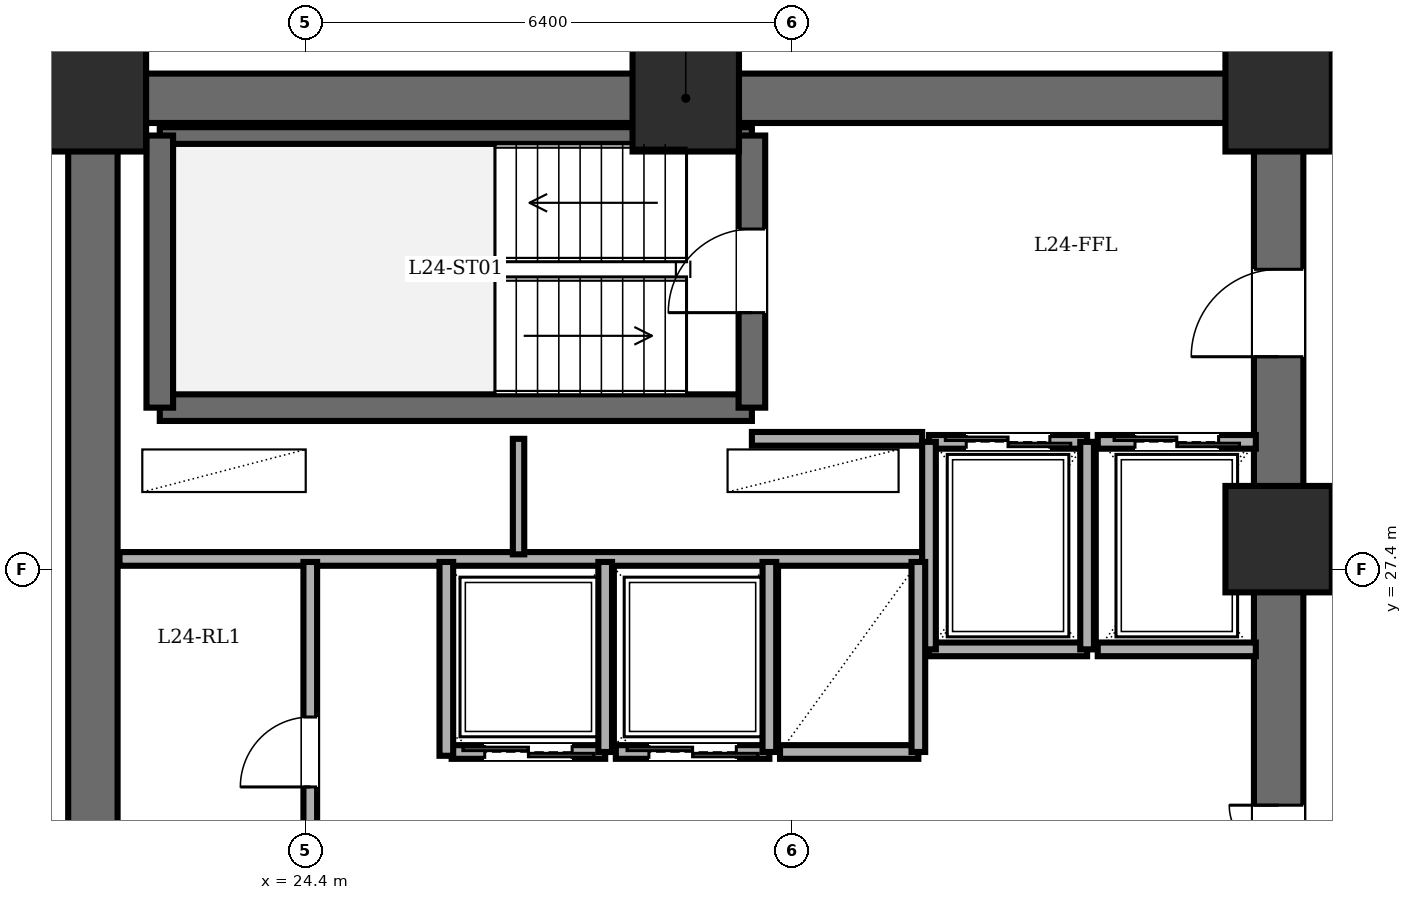
"""IFC4 building model, lengths in metres.
Left out: names, types, materials, properties, quantities, classifications, styles, units other than length and angle.
Written with IfcOpenShell. Run it as: python <this file> out.ifc"""

import sys

from ifc_helpers import new_model, si_unit, direction, frame, frame_2d, origin, origin_2d, place, context, subcontext, project, spatial, rectangle, extrude, element, fill, save


model = new_model("IFC4")
c1 = context("Model", 3, precision=1e-05, world=origin(), true_north=direction((0.0, 1.0)))
c2 = subcontext(c1, "Body", "Model", "MODEL_VIEW")
j1 = project(units=[si_unit("LENGTHUNIT", "METRE"), si_unit("PLANEANGLEUNIT", "RADIAN")], contexts=[c1])
p1 = place(None, origin())
s1 = spatial("IfcSite", under=j1, at=p1, CompositionType="ELEMENT")
p2 = place(p1, origin())
s2 = spatial("IfcBuilding", under=s1, at=p2, CompositionType="ELEMENT")
p3 = place(p2, frame((0.0, 0.0, 93.5)))
s3 = spatial("IfcBuildingStorey", under=s2, at=p3, CompositionType="ELEMENT", Elevation=93.5)
for number, where, z_axis, x_axis in (
    (1, (37.2, 27.8, 0.0), (0.0, 0.0, 1.0), (1.0, 0.0, 0.0)),
    (2, (37.2, 33.6, 0.0), (0.0, 0.0, 1.0), (1.0, 0.0, 0.0)),
    (3, (29.4, 33.6, 0.0), (0.0, 0.0, 1.0), (1.0, 0.0, 0.0)),
    (4, (21.6, 33.6, 0.0), (0.0, 0.0, 1.0), (1.0, 0.0, 0.0)),
):
    element("IfcColumn", number, at=place(p3, frame(where, z_axis=z_axis, x_axis=x_axis)), inside=s3, PredefinedType="COLUMN", context=c2, shape_type="SweptSolid", body=[
        extrude(rectangle(XDim=1.4, YDim=1.4, at=origin_2d()), origin(), (0.0, 0.0, 1.0), 3.6),
    ])
p4 = place(p3, frame((21.6, 14.4, 0.0), z_axis=(0.0, 0.0, 1.0), x_axis=(0.0, 1.0, 0.0)))
e5 = element("IfcWall", 5, at=p4, inside=s3, PredefinedType="SHEAR", context=c2, shape_type="SweptSolid", body=[
    extrude(rectangle(XDim=19.2, YDim=0.65, at=frame_2d((9.6, 0.0))), origin(), (0.0, 0.0, 1.0), 3.4),
])
p5 = place(p3, frame((21.6, 33.6, 0.0), z_axis=(0.0, 0.0, 1.0), x_axis=(1.0, 0.0, 0.0)))
e6 = element("IfcWall", 6, at=p5, inside=s3, PredefinedType="SHEAR", context=c2, shape_type="SweptSolid", body=[
    extrude(rectangle(XDim=15.6, YDim=0.65, at=frame_2d((7.8, 0.0))), origin(), (0.0, 0.0, 1.0), 3.4),
])
p6 = place(p3, frame((37.2, 14.4, 0.0), z_axis=(0.0, 0.0, 1.0), x_axis=(0.0, 1.0, 0.0)))
e7 = element("IfcWall", 7, at=p6, inside=s3, PredefinedType="SHEAR", context=c2, shape_type="SweptSolid", body=[
    extrude(rectangle(XDim=19.2, YDim=0.65, at=frame_2d((9.6, 0.0))), origin(), (0.0, 0.0, 1.0), 3.4),
])
p7 = place(p6, frame((15.8, 0.0, 0.0)))
e8 = element("IfcOpeningElement", 8, at=p7, cuts=e7, PredefinedType="OPENING", context=c2, shape_type="SweptSolid", body=[
    extrude(rectangle(XDim=1.15, YDim=2.15, at=frame_2d((0.575, 1.075))), frame((0.0, 0.335, 0.0), z_axis=(0.0, -1.0, 0.0), x_axis=(1.0, 0.0, 0.0)), (0.0, 0.0, 1.0), 0.67),
])
p8 = place(p6, frame((3.6, 0.0, 0.0)))
e9 = element("IfcOpeningElement", 9, at=p8, cuts=e7, PredefinedType="OPENING", context=c2, shape_type="SweptSolid", body=[
    extrude(rectangle(XDim=1.1, YDim=2.15, at=frame_2d((0.55, 1.075))), frame((0.0, 0.335, 0.0), z_axis=(0.0, -1.0, 0.0), x_axis=(1.0, 0.0, 0.0)), (0.0, 0.0, 1.0), 0.67),
])
p9 = place(p6, frame((8.6, 0.0, 0.0)))
e10 = element("IfcOpeningElement", 10, at=p9, cuts=e7, PredefinedType="OPENING", context=c2, shape_type="SweptSolid", body=[
    extrude(rectangle(XDim=1.3, YDim=2.2, at=frame_2d((0.65, 1.1))), frame((0.0, 0.335, 0.0), z_axis=(0.0, -1.0, 0.0), x_axis=(1.0, 0.0, 0.0)), (0.0, 0.0, 1.0), 0.67),
])
p10 = place(p3, frame((22.48, 29.53, 0.0), z_axis=(0.0, 0.0, 1.0), x_axis=(1.0, 0.0, 0.0)))
e11 = element("IfcWall", 11, at=p10, inside=s3, PredefinedType="SOLIDWALL", context=c2, shape_type="SweptSolid", body=[
    extrude(rectangle(XDim=7.79, YDim=0.35, at=frame_2d((3.895, 0.0))), origin(), (0.0, 0.0, 1.0), 3.4),
])
p11 = place(p3, frame((22.48, 33.11, 0.0), z_axis=(0.0, 0.0, 1.0), x_axis=(1.0, 0.0, 0.0)))
e12 = element("IfcWall", 12, at=p11, inside=s3, PredefinedType="PARTITIONING", context=c2, shape_type="SweptSolid", body=[
    extrude(rectangle(XDim=7.79, YDim=0.22, at=frame_2d((3.895, 0.0))), origin(), (0.0, 0.0, 1.0), 3.4),
])
p12 = place(p3, frame((22.48, 29.53, 0.0), z_axis=(0.0, 0.0, 1.0), x_axis=(0.0, 1.0, 0.0)))
e13 = element("IfcWall", 13, at=p12, inside=s3, PredefinedType="SOLIDWALL", context=c2, shape_type="SweptSolid", body=[
    extrude(rectangle(XDim=3.58, YDim=0.35, at=frame_2d((1.79, 0.0))), origin(), (0.0, 0.0, 1.0), 3.4),
])
p13 = place(p3, frame((30.27, 29.53, 0.0), z_axis=(0.0, 0.0, 1.0), x_axis=(0.0, 1.0, 0.0)))
e14 = element("IfcWall", 14, at=p13, inside=s3, PredefinedType="SOLIDWALL", context=c2, shape_type="SweptSolid", body=[
    extrude(rectangle(XDim=3.58, YDim=0.35, at=frame_2d((1.79, 0.0))), origin(), (0.0, 0.0, 1.0), 3.4),
])
p14 = place(p13, frame((1.25, 0.0, 0.0)))
e15 = element("IfcOpeningElement", 15, at=p14, cuts=e14, PredefinedType="OPENING", context=c2, shape_type="SweptSolid", body=[
    extrude(rectangle(XDim=1.1, YDim=2.15, at=frame_2d((0.55, 1.075))), frame((0.0, 0.185, 0.0), z_axis=(0.0, -1.0, 0.0), x_axis=(1.0, 0.0, 0.0)), (0.0, 0.0, 1.0), 0.37),
])
p15 = place(p3, frame((30.27, 29.12, 0.0), z_axis=(0.0, 0.0, 1.0), x_axis=(1.0, 0.0, 0.0)))
e16 = element("IfcWall", 16, at=p15, inside=s3, PredefinedType="PARTITIONING", context=c2, shape_type="SweptSolid", body=[
    extrude(rectangle(XDim=2.24, YDim=0.18, at=frame_2d((1.12, 0.0))), origin(), (0.0, 0.0, 1.0), 3.4),
])
p16 = place(p3, frame((21.95, 27.54, 0.0), z_axis=(0.0, 0.0, 1.0), x_axis=(1.0, 0.0, 0.0)))
e17 = element("IfcWall", 17, at=p16, inside=s3, PredefinedType="PARTITIONING", context=c2, shape_type="SweptSolid", body=[
    extrude(rectangle(XDim=10.56, YDim=0.18, at=frame_2d((5.28, 0.0))), origin(), (0.0, 0.0, 1.0), 3.4),
])
p17 = place(p3, frame((27.2, 27.6, 0.0), z_axis=(0.0, 0.0, 1.0), x_axis=(0.0, 1.0, 0.0)))
e18 = element("IfcWall", 18, at=p17, inside=s3, PredefinedType="PARTITIONING", context=c2, shape_type="SweptSolid", body=[
    extrude(rectangle(XDim=1.52, YDim=0.15, at=frame_2d((0.76, 0.0))), origin(), (0.0, 0.0, 1.0), 3.4),
])
p18 = place(p3, frame((32.6, 29.08, 0.0), z_axis=(0.0, 0.0, 1.0), x_axis=(1.0, 0.0, 0.0)))
e19 = element("IfcWall", 19, at=p18, inside=s3, PredefinedType="PARTITIONING", context=c2, shape_type="SweptSolid", body=[
    extrude(rectangle(XDim=2.08, YDim=0.18, at=frame_2d((1.04, 0.0))), origin(), (0.0, 0.0, 1.0), 3.4),
])
p19 = place(p18, frame((0.49, 0.0, 0.0)))
e20 = element("IfcOpeningElement", 20, at=p19, cuts=e19, PredefinedType="OPENING", context=c2, shape_type="SweptSolid", body=[
    extrude(rectangle(XDim=1.1, YDim=2.2, at=frame_2d((0.55, 1.1))), frame((0.0, 0.1, 0.0), z_axis=(0.0, -1.0, 0.0), x_axis=(1.0, 0.0, 0.0)), (0.0, 0.0, 1.0), 0.2),
])
p20 = place(p3, frame((34.68, 26.35, 0.0), z_axis=(0.0, 0.0, 1.0), x_axis=(-1.0, 0.0, 0.0)))
e21 = element("IfcWall", 21, at=p20, inside=s3, PredefinedType="PARTITIONING", context=c2, shape_type="SweptSolid", body=[
    extrude(rectangle(XDim=2.08, YDim=0.18, at=frame_2d((1.04, 0.0))), origin(), (0.0, 0.0, 1.0), 3.4),
])
for number, where, z_axis, x_axis in (
    (22, (34.68, 26.35, 0.0), (0.0, 0.0, 1.0), (0.0, 1.0, 0.0)),
    (23, (32.6, 29.08, 0.0), (0.0, 0.0, 1.0), (0.0, -1.0, 0.0)),
):
    element("IfcWall", number, at=place(p3, frame(where, z_axis=z_axis, x_axis=x_axis)), inside=s3, PredefinedType="PARTITIONING", context=c2, shape_type="SweptSolid", body=[
        extrude(rectangle(XDim=2.73, YDim=0.18, at=frame_2d((1.365, 0.0))), origin(), (0.0, 0.0, 1.0), 3.4),
    ])
p21 = place(p3, frame((34.82, 29.08, 0.0), z_axis=(0.0, 0.0, 1.0), x_axis=(1.0, 0.0, 0.0)))
e24 = element("IfcWall", 24, at=p21, inside=s3, PredefinedType="PARTITIONING", context=c2, shape_type="SweptSolid", body=[
    extrude(rectangle(XDim=2.08, YDim=0.18, at=frame_2d((1.04, 0.0))), origin(), (0.0, 0.0, 1.0), 3.4),
])
p22 = place(p21, frame((0.49, 0.0, 0.0)))
e25 = element("IfcOpeningElement", 25, at=p22, cuts=e24, PredefinedType="OPENING", context=c2, shape_type="SweptSolid", body=[
    extrude(rectangle(XDim=1.1, YDim=2.2, at=frame_2d((0.55, 1.1))), frame((0.0, 0.1, 0.0), z_axis=(0.0, -1.0, 0.0), x_axis=(1.0, 0.0, 0.0)), (0.0, 0.0, 1.0), 0.2),
])
p23 = place(p3, frame((36.9, 26.35, 0.0), z_axis=(0.0, 0.0, 1.0), x_axis=(-1.0, 0.0, 0.0)))
e26 = element("IfcWall", 26, at=p23, inside=s3, PredefinedType="PARTITIONING", context=c2, shape_type="SweptSolid", body=[
    extrude(rectangle(XDim=2.08, YDim=0.18, at=frame_2d((1.04, 0.0))), origin(), (0.0, 0.0, 1.0), 3.4),
])
p24 = place(p3, frame((28.34, 25.0, 0.0), z_axis=(0.0, 0.0, 1.0), x_axis=(-1.0, 0.0, 0.0)))
e27 = element("IfcWall", 27, at=p24, inside=s3, PredefinedType="PARTITIONING", context=c2, shape_type="SweptSolid", body=[
    extrude(rectangle(XDim=2.02, YDim=0.18, at=frame_2d((1.01, 0.0))), origin(), (0.0, 0.0, 1.0), 3.4),
])
p25 = place(p24, frame((0.435, 0.0, 0.0)))
e28 = element("IfcOpeningElement", 28, at=p25, cuts=e27, PredefinedType="OPENING", context=c2, shape_type="SweptSolid", body=[
    extrude(rectangle(XDim=1.15, YDim=2.2, at=frame_2d((0.575, 1.1))), frame((0.0, 0.1, 0.0), z_axis=(0.0, -1.0, 0.0), x_axis=(1.0, 0.0, 0.0)), (0.0, 0.0, 1.0), 0.2),
])
p26 = place(p3, frame((28.34, 25.0, 0.0), z_axis=(0.0, 0.0, 1.0), x_axis=(0.0, 1.0, 0.0)))
e29 = element("IfcWall", 29, at=p26, inside=s3, PredefinedType="PARTITIONING", context=c2, shape_type="SweptSolid", body=[
    extrude(rectangle(XDim=2.5, YDim=0.18, at=frame_2d((1.25, 0.0))), origin(), (0.0, 0.0, 1.0), 3.4),
])
p27 = place(p3, frame((30.5, 25.0, 0.0), z_axis=(0.0, 0.0, 1.0), x_axis=(-1.0, 0.0, 0.0)))
e30 = element("IfcWall", 30, at=p27, inside=s3, PredefinedType="PARTITIONING", context=c2, shape_type="SweptSolid", body=[
    extrude(rectangle(XDim=2.02, YDim=0.18, at=frame_2d((1.01, 0.0))), origin(), (0.0, 0.0, 1.0), 3.4),
])
p28 = place(p27, frame((0.435, 0.0, 0.0)))
e31 = element("IfcOpeningElement", 31, at=p28, cuts=e30, PredefinedType="OPENING", context=c2, shape_type="SweptSolid", body=[
    extrude(rectangle(XDim=1.15, YDim=2.2, at=frame_2d((0.575, 1.1))), frame((0.0, 0.1, 0.0), z_axis=(0.0, -1.0, 0.0), x_axis=(1.0, 0.0, 0.0)), (0.0, 0.0, 1.0), 0.2),
])
p29 = place(p3, frame((30.5, 25.0, 0.0), z_axis=(0.0, 0.0, 1.0), x_axis=(0.0, 1.0, 0.0)))
e32 = element("IfcWall", 32, at=p29, inside=s3, PredefinedType="PARTITIONING", context=c2, shape_type="SweptSolid", body=[
    extrude(rectangle(XDim=2.5, YDim=0.18, at=frame_2d((1.25, 0.0))), origin(), (0.0, 0.0, 1.0), 3.4),
])
p30 = place(p3, frame((32.46, 25.0, 0.0), z_axis=(0.0, 0.0, 1.0), x_axis=(-1.0, 0.0, 0.0)))
e33 = element("IfcWall", 33, at=p30, inside=s3, PredefinedType="PARTITIONING", context=c2, shape_type="SweptSolid", body=[
    extrude(rectangle(XDim=1.82, YDim=0.18, at=frame_2d((0.91, 0.0))), origin(), (0.0, 0.0, 1.0), 3.4),
])
p31 = place(p3, frame((32.46, 25.0, 0.0), z_axis=(0.0, 0.0, 1.0), x_axis=(0.0, 1.0, 0.0)))
e34 = element("IfcWall", 34, at=p31, inside=s3, PredefinedType="PARTITIONING", context=c2, shape_type="SweptSolid", body=[
    extrude(rectangle(XDim=2.5, YDim=0.18, at=frame_2d((1.25, 0.0))), origin(), (0.0, 0.0, 1.0), 3.4),
])
p32 = place(p3, frame((24.46, 22.5, 0.0), z_axis=(0.0, 0.0, 1.0), x_axis=(0.0, 1.0, 0.0)))
e35 = element("IfcWall", 35, at=p32, inside=s3, PredefinedType="PARTITIONING", context=c2, shape_type="SweptSolid", body=[
    extrude(rectangle(XDim=5.0, YDim=0.18, at=frame_2d((2.5, 0.0))), origin(), (0.0, 0.0, 1.0), 3.4),
])
p33 = place(p32, frame((2.04, 0.0, 0.0)))
e36 = element("IfcOpeningElement", 36, at=p33, cuts=e35, PredefinedType="OPENING", context=c2, shape_type="SweptSolid", body=[
    extrude(rectangle(XDim=0.92, YDim=2.1, at=frame_2d((0.46, 1.05))), frame((0.0, 0.1, 0.0), z_axis=(0.0, -1.0, 0.0), x_axis=(1.0, 0.0, 0.0)), (0.0, 0.0, 1.0), 0.2),
])
p34 = place(p3, frame((26.25, 24.95, 0.0), z_axis=(0.0, 0.0, 1.0), x_axis=(0.0, 1.0, 0.0)))
e37 = element("IfcWall", 37, at=p34, inside=s3, PredefinedType="PARTITIONING", context=c2, shape_type="SweptSolid", body=[
    extrude(rectangle(XDim=2.55, YDim=0.18, at=frame_2d((1.275, 0.0))), origin(), (0.0, 0.0, 1.0), 3.4),
])
p35 = place(p3, frame((8.8, 33.82, 0.0), z_axis=(0.0, 0.0, 1.0), x_axis=(1.0, 0.0, 0.0)))
e38 = element("IfcWall", 38, at=p35, inside=s3, PredefinedType="PARTITIONING", context=c2, shape_type="SweptSolid", body=[
    extrude(rectangle(XDim=12.68, YDim=0.22, at=frame_2d((6.34, 0.0))), origin(), (0.0, 0.0, 1.0), 3.4),
])
p36 = place(p35, frame((6.18, 0.0, 0.0)))
e39 = element("IfcOpeningElement", 39, at=p36, cuts=e38, PredefinedType="OPENING", context=c2, shape_type="SweptSolid", body=[
    extrude(rectangle(XDim=1.0, YDim=2.15, at=frame_2d((0.5, 1.075))), frame((0.0, 0.12, 0.0), z_axis=(0.0, -1.0, 0.0), x_axis=(1.0, 0.0, 0.0)), (0.0, 0.0, 1.0), 0.24),
])
p37 = place(p14, origin())
e40 = element("IfcDoor", 40, at=p37, inside=s3, OperationType="SINGLE_SWING_LEFT", PredefinedType="DOOR", context=c2, shape_type="SweptSolid", body=[
    extrude(rectangle(XDim=1.1, YDim=2.15, at=frame_2d((0.55, 1.075))), frame((0.0, 0.025, 0.0), z_axis=(0.0, -1.0, 0.0), x_axis=(1.0, 0.0, 0.0)), (0.0, 0.0, 1.0), 0.05),
])
fill(e15, e40)
p38 = place(p7, origin())
e41 = element("IfcDoor", 41, at=p38, inside=s3, OperationType="SINGLE_SWING_LEFT", PredefinedType="DOOR", context=c2, shape_type="SweptSolid", body=[
    extrude(rectangle(XDim=1.15, YDim=2.15, at=frame_2d((0.575, 1.075))), frame((0.0, 0.025, 0.0), z_axis=(0.0, -1.0, 0.0), x_axis=(1.0, 0.0, 0.0)), (0.0, 0.0, 1.0), 0.05),
])
fill(e8, e41)
p39 = place(p19, origin())
e42 = element("IfcDoor", 42, at=p39, inside=s3, OperationType="DOUBLE_DOOR_SLIDING", PredefinedType="DOOR", context=c2, shape_type="SweptSolid", body=[
    extrude(rectangle(XDim=1.1, YDim=2.2, at=frame_2d((0.55, 1.1))), frame((0.0, 0.025, 0.0), z_axis=(0.0, -1.0, 0.0), x_axis=(1.0, 0.0, 0.0)), (0.0, 0.0, 1.0), 0.05),
])
fill(e20, e42)
p40 = place(p22, origin())
e43 = element("IfcDoor", 43, at=p40, inside=s3, OperationType="DOUBLE_DOOR_SLIDING", PredefinedType="DOOR", context=c2, shape_type="SweptSolid", body=[
    extrude(rectangle(XDim=1.1, YDim=2.2, at=frame_2d((0.55, 1.1))), frame((0.0, 0.025, 0.0), z_axis=(0.0, -1.0, 0.0), x_axis=(1.0, 0.0, 0.0)), (0.0, 0.0, 1.0), 0.05),
])
fill(e25, e43)
p41 = place(p25, origin())
e44 = element("IfcDoor", 44, at=p41, inside=s3, OperationType="DOUBLE_DOOR_SLIDING", PredefinedType="DOOR", context=c2, shape_type="SweptSolid", body=[
    extrude(rectangle(XDim=1.15, YDim=2.2, at=frame_2d((0.575, 1.1))), frame((0.0, 0.025, 0.0), z_axis=(0.0, -1.0, 0.0), x_axis=(1.0, 0.0, 0.0)), (0.0, 0.0, 1.0), 0.05),
])
fill(e28, e44)
p42 = place(p28, origin())
e45 = element("IfcDoor", 45, at=p42, inside=s3, OperationType="DOUBLE_DOOR_SLIDING", PredefinedType="DOOR", context=c2, shape_type="SweptSolid", body=[
    extrude(rectangle(XDim=1.15, YDim=2.2, at=frame_2d((0.575, 1.1))), frame((0.0, 0.025, 0.0), z_axis=(0.0, -1.0, 0.0), x_axis=(1.0, 0.0, 0.0)), (0.0, 0.0, 1.0), 0.05),
])
fill(e31, e45)
p43 = place(p33, origin())
e46 = element("IfcDoor", 46, at=p43, inside=s3, OperationType="SINGLE_SWING_LEFT", PredefinedType="DOOR", context=c2, shape_type="SweptSolid", body=[
    extrude(rectangle(XDim=0.92, YDim=2.1, at=frame_2d((0.46, 1.05))), frame((0.0, 0.025, 0.0), z_axis=(0.0, -1.0, 0.0), x_axis=(1.0, 0.0, 0.0)), (0.0, 0.0, 1.0), 0.05),
])
fill(e36, e46)
p44 = place(p9, origin())
e47 = element("IfcDoor", 47, at=p44, inside=s3, OperationType="DOUBLE_DOOR_SINGLE_SWING", PredefinedType="DOOR", context=c2, shape_type="SweptSolid", body=[
    extrude(rectangle(XDim=1.3, YDim=2.2, at=frame_2d((0.65, 1.1))), frame((0.0, 0.025, 0.0), z_axis=(0.0, -1.0, 0.0), x_axis=(1.0, 0.0, 0.0)), (0.0, 0.0, 1.0), 0.05),
])
fill(e10, e47)
save(model, sys.argv[1])
